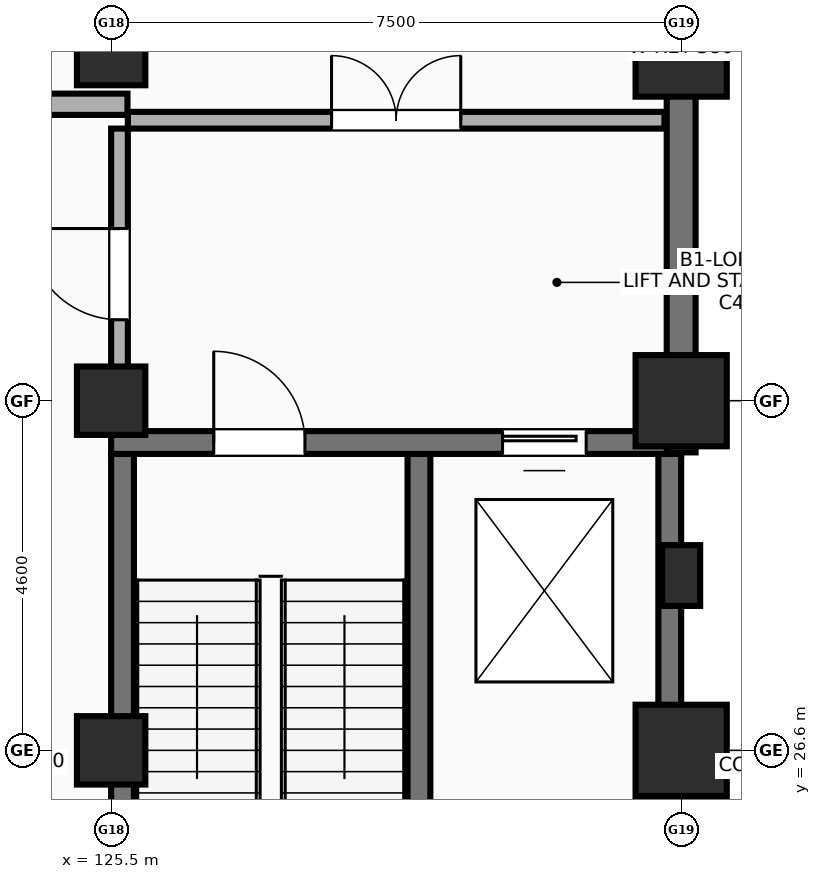
"""IFC4 building model, lengths in metres.
Left out: names, types, materials, properties, quantities, classifications, styles, units other than length and angle.
Written with IfcOpenShell. Run it as: python <this file> out.ifc"""

import sys

from ifc_helpers import new_model, si_unit, direction, frame, frame_2d, origin, origin_2d, place, context, subcontext, project, spatial, rectangle, extrude, element, fill, save


model = new_model("IFC4")
c1 = context("Model", 3, precision=1e-05, world=origin(), true_north=direction((0.0, 1.0)))
c2 = subcontext(c1, "Body", "Model", "MODEL_VIEW")
j1 = project(units=[si_unit("LENGTHUNIT", "METRE"), si_unit("PLANEANGLEUNIT", "RADIAN")], contexts=[c1])
p1 = place(None, origin())
s1 = spatial("IfcSite", under=j1, at=p1, CompositionType="ELEMENT")
p2 = place(p1, origin())
s2 = spatial("IfcBuilding", under=s1, at=p2, CompositionType="ELEMENT")
p3 = place(p2, frame((0.0, 0.0, -4.2)))
s3 = spatial("IfcBuildingStorey", under=s2, at=p3, CompositionType="ELEMENT", Elevation=-4.2)
for number, where, z_axis, x_axis in (
    (1, (125.5, 26.6, -0.42), (0.0, 0.0, 1.0), (1.0, 0.0, 0.0)),
    (2, (125.5, 31.2, -0.42), (0.0, 0.0, 1.0), (1.0, 0.0, 0.0)),
    (3, (125.5, 35.8, -0.42), (0.0, 0.0, 1.0), (1.0, 0.0, 0.0)),
):
    element("IfcColumn", number, at=place(p3, frame(where, z_axis=z_axis, x_axis=x_axis)), inside=s3, PredefinedType="COLUMN", context=c2, shape_type="SweptSolid", body=[
        extrude(rectangle(XDim=0.9, YDim=0.9, at=origin_2d()), origin(), (0.0, 0.0, 1.0), 4.62),
    ])
for number, where, z_axis, x_axis in (
    (4, (133.0, 26.6, -0.42), (0.0, 0.0, 1.0), (1.0, 0.0, 0.0)),
    (5, (133.0, 31.2, -0.42), (0.0, 0.0, 1.0), (1.0, 0.0, 0.0)),
    (6, (133.0, 35.8, -0.42), (0.0, 0.0, 1.0), (1.0, 0.0, 0.0)),
):
    element("IfcColumn", number, at=place(p3, frame(where, z_axis=z_axis, x_axis=x_axis)), inside=s3, PredefinedType="COLUMN", context=c2, shape_type="SweptSolid", body=[
        extrude(rectangle(XDim=1.2, YDim=1.2, at=origin_2d()), origin(), (0.0, 0.0, 1.0), 4.62),
    ])
p4 = place(p3, frame((133.0, 28.9, -0.42), z_axis=(0.0, 0.0, 1.0), x_axis=(1.0, 0.0, 0.0)))
e7 = element("IfcColumn", 7, at=p4, inside=s3, PredefinedType="PILASTER", context=c2, shape_type="SweptSolid", body=[
    extrude(rectangle(XDim=0.5, YDim=0.8, at=origin_2d()), origin(), (0.0, 0.0, 1.0), 4.62),
])
for number, where, z_axis, x_axis in (
    (8, (125.65, 22.3, -0.42), (0.0, 0.0, 1.0), (0.0, 1.0, 0.0)),
    (9, (132.85, 22.3, -0.42), (0.0, 0.0, 1.0), (0.0, 1.0, 0.0)),
    (10, (129.55, 22.3, -0.42), (0.0, 0.0, 1.0), (0.0, 1.0, 0.0)),
):
    element("IfcWall", number, at=place(p3, frame(where, z_axis=z_axis, x_axis=x_axis)), inside=s3, PredefinedType="SHEAR", context=c2, shape_type="SweptSolid", body=[
        extrude(rectangle(XDim=8.2, YDim=0.3, at=frame_2d((4.1, 0.0))), origin(), (0.0, 0.0, 1.0), 4.62),
    ])
p5 = place(p3, frame((125.5, 30.65, 0.0), z_axis=(0.0, 0.0, 1.0), x_axis=(1.0, 0.0, 0.0)))
e11 = element("IfcWall", 11, at=p5, inside=s3, PredefinedType="SHEAR", context=c2, shape_type="SweptSolid", body=[
    extrude(rectangle(XDim=7.5, YDim=0.3, at=frame_2d((3.75, 0.0))), origin(), (0.0, 0.0, 1.0), 4.2),
])
p6 = place(p5, frame((1.35, 0.0, 0.0)))
e12 = element("IfcOpeningElement", 12, at=p6, cuts=e11, PredefinedType="OPENING", context=c2, shape_type="SweptSolid", body=[
    extrude(rectangle(XDim=1.2, YDim=2.15, at=frame_2d((0.6, 1.075))), frame((0.0, 0.16, 0.0), z_axis=(0.0, -1.0, 0.0), x_axis=(1.0, 0.0, 0.0)), (0.0, 0.0, 1.0), 0.32),
])
p7 = place(p5, frame((5.15, 0.0, 0.0)))
e13 = element("IfcOpeningElement", 13, at=p7, cuts=e11, PredefinedType="OPENING", context=c2, shape_type="SweptSolid", body=[
    extrude(rectangle(XDim=1.1, YDim=2.15, at=frame_2d((0.55, 1.075))), frame((0.0, 0.16, 0.0), z_axis=(0.0, -1.0, 0.0), x_axis=(1.0, 0.0, 0.0)), (0.0, 0.0, 1.0), 0.32),
])
p8 = place(p3, frame((125.72, 34.89, 0.0), z_axis=(0.0, 0.0, 1.0), x_axis=(1.0, 0.0, 0.0)))
e14 = element("IfcWall", 14, at=p8, inside=s3, PredefinedType="SOLIDWALL", context=c2, shape_type="SweptSolid", body=[
    extrude(rectangle(XDim=7.06, YDim=0.22, at=frame_2d((3.53, 0.0))), origin(), (0.0, 0.0, 1.0), 3.16),
])
p9 = place(p8, frame((2.68, 0.0, 0.0)))
e15 = element("IfcOpeningElement", 15, at=p9, cuts=e14, PredefinedType="OPENING", context=c2, shape_type="SweptSolid", body=[
    extrude(rectangle(XDim=1.7, YDim=2.18, at=frame_2d((0.85, 1.09))), frame((0.0, 0.12, 0.0), z_axis=(0.0, -1.0, 0.0), x_axis=(1.0, 0.0, 0.0)), (0.0, 0.0, 1.0), 0.24),
])
p10 = place(p3, frame((125.61, 30.95, 0.0), z_axis=(0.0, 0.0, 1.0), x_axis=(0.0, 1.0, 0.0)))
e16 = element("IfcWall", 16, at=p10, inside=s3, PredefinedType="SOLIDWALL", context=c2, shape_type="SweptSolid", body=[
    extrude(rectangle(XDim=3.83, YDim=0.22, at=frame_2d((1.915, 0.0))), origin(), (0.0, 0.0, 1.0), 2.96),
])
p11 = place(p10, frame((1.315, 0.0, 0.0)))
e17 = element("IfcOpeningElement", 17, at=p11, cuts=e16, PredefinedType="OPENING", context=c2, shape_type="SweptSolid", body=[
    extrude(rectangle(XDim=1.2, YDim=2.15, at=frame_2d((0.6, 1.075))), frame((0.0, 0.12, 0.0), z_axis=(0.0, -1.0, 0.0), x_axis=(1.0, 0.0, 0.0)), (0.0, 0.0, 1.0), 0.24),
])
p12 = place(p3, frame((111.0, 35.1, 0.0), z_axis=(0.0, 0.0, 1.0), x_axis=(1.0, 0.0, 0.0)))
e18 = element("IfcWall", 18, at=p12, inside=s3, PredefinedType="SOLIDWALL", context=c2, shape_type="SweptSolid", body=[
    extrude(rectangle(XDim=14.715, YDim=0.28, at=frame_2d((7.357, 0.0))), origin(), (0.0, 0.0, 1.0), 3.16),
])
p13 = place(p12, frame((7.725, 0.0, 0.0)))
e19 = element("IfcOpeningElement", 19, at=p13, cuts=e18, PredefinedType="OPENING", context=c2, shape_type="SweptSolid", body=[
    extrude(rectangle(XDim=1.6, YDim=2.18, at=frame_2d((0.8, 1.09))), frame((0.0, 0.15, 0.0), z_axis=(0.0, -1.0, 0.0), x_axis=(1.0, 0.0, 0.0)), (0.0, 0.0, 1.0), 0.3),
])
p14 = place(p3, frame((133.0, 30.52, -0.42), z_axis=(0.0, 0.0, 1.0), x_axis=(0.0, 1.0, 0.0)))
e20 = element("IfcWall", 20, at=p14, inside=s3, PredefinedType="SHEAR", context=c2, shape_type="SweptSolid", body=[
    extrude(rectangle(XDim=41.43, YDim=0.38, at=frame_2d((20.715, 0.0))), origin(), (0.0, 0.0, 1.0), 4.3),
])
p15 = place(p6, origin())
e21 = element("IfcDoor", 21, at=p15, inside=s3, OperationType="SINGLE_SWING_LEFT", PredefinedType="DOOR", context=c2, shape_type="SweptSolid", body=[
    extrude(rectangle(XDim=1.2, YDim=2.15, at=frame_2d((0.6, 1.075))), frame((0.0, 0.025, 0.0), z_axis=(0.0, -1.0, 0.0), x_axis=(1.0, 0.0, 0.0)), (0.0, 0.0, 1.0), 0.05),
])
fill(e12, e21)
p16 = place(p7, origin())
e22 = element("IfcDoor", 22, at=p16, inside=s3, OperationType="SLIDING_TO_LEFT", PredefinedType="DOOR", context=c2, shape_type="SweptSolid", body=[
    extrude(rectangle(XDim=1.1, YDim=2.15, at=frame_2d((0.55, 1.075))), frame((0.0, 0.025, 0.0), z_axis=(0.0, -1.0, 0.0), x_axis=(1.0, 0.0, 0.0)), (0.0, 0.0, 1.0), 0.05),
])
fill(e13, e22)
p17 = place(p9, origin())
e23 = element("IfcDoor", 23, at=p17, inside=s3, OperationType="DOUBLE_DOOR_SINGLE_SWING", PredefinedType="DOOR", context=c2, shape_type="SweptSolid", body=[
    extrude(rectangle(XDim=1.7, YDim=2.18, at=frame_2d((0.85, 1.09))), frame((0.0, 0.025, 0.0), z_axis=(0.0, -1.0, 0.0), x_axis=(1.0, 0.0, 0.0)), (0.0, 0.0, 1.0), 0.05),
])
fill(e15, e23)
p18 = place(p11, origin())
e24 = element("IfcDoor", 24, at=p18, inside=s3, OperationType="SINGLE_SWING_RIGHT", PredefinedType="DOOR", context=c2, shape_type="SweptSolid", body=[
    extrude(rectangle(XDim=1.2, YDim=2.15, at=frame_2d((0.6, 1.075))), frame((0.0, 0.025, 0.0), z_axis=(0.0, -1.0, 0.0), x_axis=(1.0, 0.0, 0.0)), (0.0, 0.0, 1.0), 0.05),
])
fill(e17, e24)
save(model, sys.argv[1])
